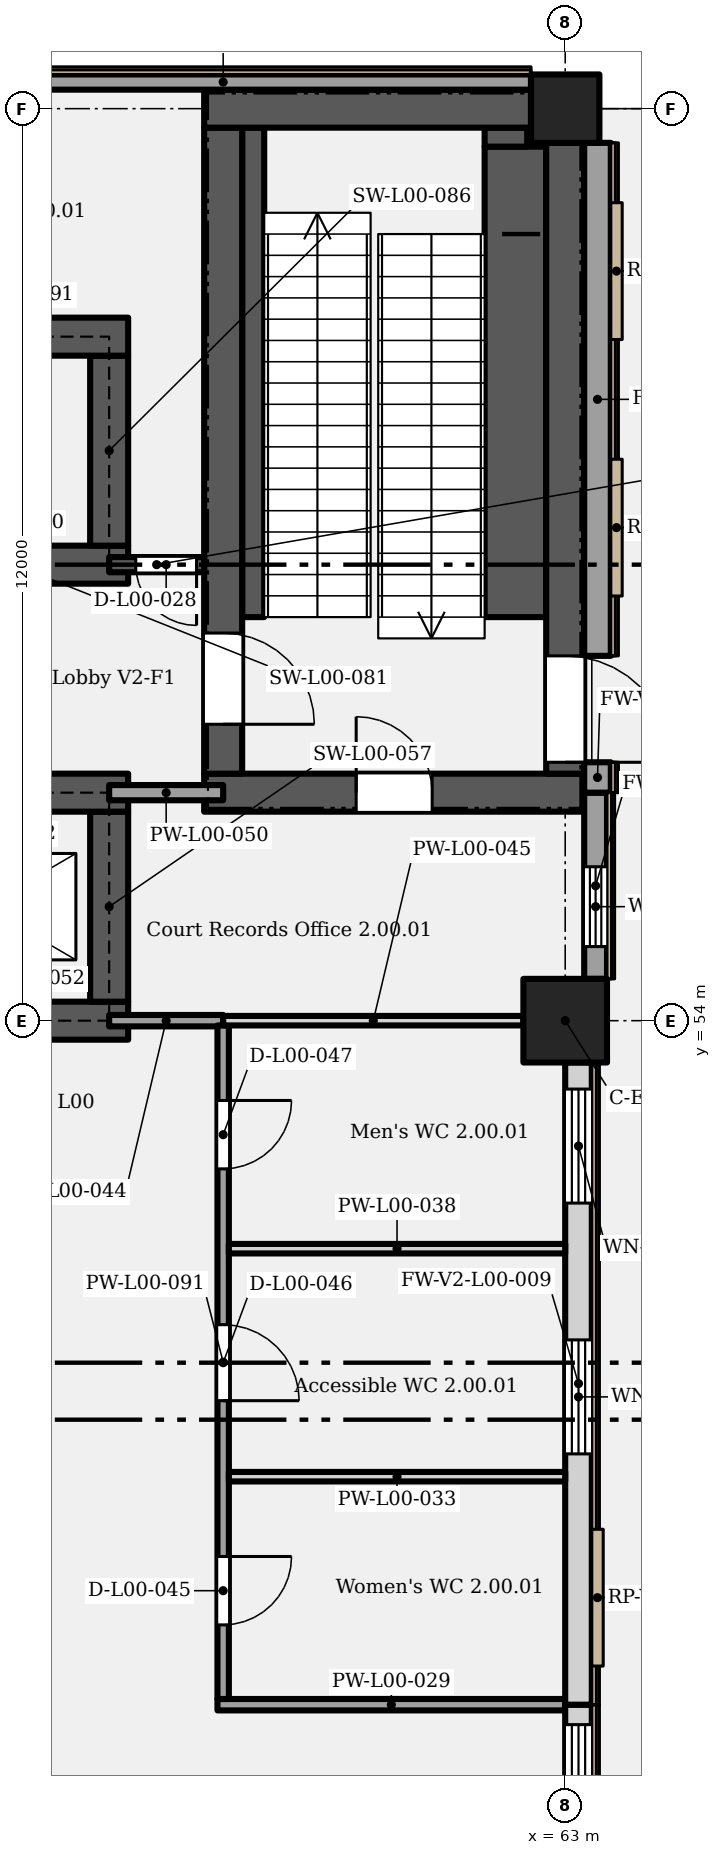
"""IFC4 building model, lengths in metres.
Left out: names, types, materials, properties, quantities, classifications, styles, units other than length and angle.
Written with IfcOpenShell. Run it as: python <this file> out.ifc"""

import sys

from ifc_helpers import new_model, si_unit, direction, frame, frame_2d, origin, origin_2d, place, context, subcontext, project, spatial, rectangle, extrude, element, fill, save


model = new_model("IFC4")
c1 = context("Model", 3, precision=1e-05, world=origin(), true_north=direction((0.0, 1.0)))
c2 = subcontext(c1, "Body", "Model", "MODEL_VIEW")
j1 = project(units=[si_unit("LENGTHUNIT", "METRE"), si_unit("PLANEANGLEUNIT", "RADIAN")], contexts=[c1])
p1 = place(None, origin())
s1 = spatial("IfcSite", under=j1, at=p1, CompositionType="ELEMENT")
p2 = place(p1, origin())
s2 = spatial("IfcBuilding", under=s1, at=p2, CompositionType="ELEMENT")
p3 = place(p2, origin())
s3 = spatial("IfcBuildingStorey", under=s2, at=p3, CompositionType="ELEMENT", Elevation=0.0)
p4 = place(p3, frame((63.0, 54.0, 0.0), z_axis=(0.0, 0.0, 1.0), x_axis=(1.0, 0.0, 0.0)))
e1 = element("IfcColumn", 1, at=p4, inside=s3, PredefinedType="COLUMN", context=c2, shape_type="SweptSolid", body=[
    extrude(rectangle(XDim=1.1, YDim=1.1, at=origin_2d()), origin(), (0.0, 0.0, 1.0), 6.6),
])
p5 = place(p3, frame((63.0, 66.0, 0.0), z_axis=(0.0, 0.0, 1.0), x_axis=(1.0, 0.0, 0.0)))
e2 = element("IfcColumn", 2, at=p5, inside=s3, PredefinedType="COLUMN", context=c2, shape_type="SweptSolid", body=[
    extrude(rectangle(XDim=0.9, YDim=0.9, at=origin_2d()), origin(), (0.0, 0.0, 1.0), 6.6),
])
p6 = place(p3, frame((54.55, 54.0, 0.0), z_axis=(0.0, 0.0, 1.0), x_axis=(1.0, 0.0, 0.0)))
e3 = element("IfcWall", 3, at=p6, inside=s3, PredefinedType="SHEAR", context=c2, shape_type="SweptSolid", body=[
    extrude(rectangle(XDim=2.7, YDim=0.5, at=frame_2d((1.35, 0.0))), origin(), (0.0, 0.0, 1.0), 6.3),
])
p7 = place(p3, frame((57.0, 54.25, 0.0), z_axis=(0.0, 0.0, 1.0), x_axis=(0.0, 1.0, 0.0)))
e4 = element("IfcWall", 4, at=p7, inside=s3, PredefinedType="SHEAR", context=c2, shape_type="SweptSolid", body=[
    extrude(rectangle(XDim=2.5, YDim=0.5, at=frame_2d((1.25, 0.0))), origin(), (0.0, 0.0, 1.0), 6.3),
])
p8 = place(p3, frame((46.25, 57.0, 0.0), z_axis=(0.0, 0.0, 1.0), x_axis=(1.0, 0.0, 0.0)))
e5 = element("IfcWall", 5, at=p8, inside=s3, PredefinedType="SHEAR", context=c2, shape_type="SweptSolid", body=[
    extrude(rectangle(XDim=11.0, YDim=0.5, at=frame_2d((5.5, 0.0))), origin(), (0.0, 0.0, 1.0), 6.3),
])
p9 = place(p8, frame((6.1, 0.0, 0.0), z_axis=(0.0, 0.0, 1.0), x_axis=(-1.0, 0.0, 0.0)))
e6 = element("IfcOpeningElement", 6, at=p9, cuts=e5, PredefinedType="OPENING", context=c2, shape_type="SweptSolid", body=[
    extrude(rectangle(XDim=1.2, YDim=2.1, at=frame_2d((0.6, 1.05))), frame((0.0, 0.26, 0.0), z_axis=(0.0, -1.0, 0.0), x_axis=(1.0, 0.0, 0.0)), (0.0, 0.0, 1.0), 0.52),
])
p10 = place(p3, frame((58.25, 57.0, 0.0), z_axis=(0.0, 0.0, 1.0), x_axis=(1.0, 0.0, 0.0)))
e7 = element("IfcWall", 7, at=p10, inside=s3, PredefinedType="SHEAR", context=c2, shape_type="SweptSolid", body=[
    extrude(rectangle(XDim=5.0, YDim=0.5, at=frame_2d((2.5, 0.0))), origin(), (0.0, 0.0, 1.0), 6.3),
])
p11 = place(p10, frame((2.0, 0.0, 0.0)))
e8 = element("IfcOpeningElement", 8, at=p11, cuts=e7, PredefinedType="OPENING", context=c2, shape_type="SweptSolid", body=[
    extrude(rectangle(XDim=1.0, YDim=2.1, at=frame_2d((0.5, 1.05))), frame((0.0, 0.26, 0.0), z_axis=(0.0, -1.0, 0.0), x_axis=(1.0, 0.0, 0.0)), (0.0, 0.0, 1.0), 0.52),
])
p12 = place(p3, frame((58.5, 57.25, 0.0), z_axis=(0.0, 0.0, 1.0), x_axis=(0.0, 1.0, 0.0)))
e9 = element("IfcWall", 9, at=p12, inside=s3, PredefinedType="SHEAR", context=c2, shape_type="SweptSolid", body=[
    extrude(rectangle(XDim=8.5, YDim=0.5, at=frame_2d((4.25, 0.0))), origin(), (0.0, 0.0, 1.0), 6.3),
])
p13 = place(p12, frame((1.85, 0.0, 0.0), z_axis=(0.0, 0.0, 1.0), x_axis=(-1.0, 0.0, 0.0)))
e10 = element("IfcOpeningElement", 10, at=p13, cuts=e9, PredefinedType="OPENING", context=c2, shape_type="SweptSolid", body=[
    extrude(rectangle(XDim=1.2, YDim=2.1, at=frame_2d((0.6, 1.05))), frame((0.0, 0.26, 0.0), z_axis=(0.0, -1.0, 0.0), x_axis=(1.0, 0.0, 0.0)), (0.0, 0.0, 1.0), 0.52),
])
p14 = place(p3, frame((63.0, 57.25, 0.0), z_axis=(0.0, 0.0, 1.0), x_axis=(0.0, 1.0, 0.0)))
e11 = element("IfcWall", 11, at=p14, inside=s3, PredefinedType="SHEAR", context=c2, shape_type="SweptSolid", body=[
    extrude(rectangle(XDim=8.3, YDim=0.5, at=frame_2d((4.15, 0.0))), origin(), (0.0, 0.0, 1.0), 6.3),
])
p15 = place(p14, frame((1.55, 0.0, 0.0), z_axis=(0.0, 0.0, 1.0), x_axis=(-1.0, 0.0, 0.0)))
e12 = element("IfcOpeningElement", 12, at=p15, cuts=e11, PredefinedType="OPENING", context=c2, shape_type="SweptSolid", body=[
    extrude(rectangle(XDim=1.4, YDim=2.1, at=frame_2d((0.7, 1.05))), frame((0.0, 0.26, 0.0), z_axis=(0.0, -1.0, 0.0), x_axis=(1.0, 0.0, 0.0)), (0.0, 0.0, 1.0), 0.52),
])
p16 = place(p3, frame((54.25, 60.0, 0.0), z_axis=(0.0, 0.0, 1.0), x_axis=(1.0, 0.0, 0.0)))
e13 = element("IfcWall", 13, at=p16, inside=s3, PredefinedType="SHEAR", context=c2, shape_type="SweptSolid", body=[
    extrude(rectangle(XDim=3.0, YDim=0.5, at=frame_2d((1.5, 0.0))), origin(), (0.0, 0.0, 1.0), 6.3),
])
p17 = place(p16, frame((0.7, 0.0, 0.0)))
e14 = element("IfcOpeningElement", 14, at=p17, cuts=e13, PredefinedType="OPENING", context=c2, shape_type="SweptSolid", body=[
    extrude(rectangle(XDim=1.1, YDim=2.1, at=frame_2d((0.55, 1.05))), frame((0.0, 0.26, 0.0), z_axis=(0.0, -1.0, 0.0), x_axis=(1.0, 0.0, 0.0)), (0.0, 0.0, 1.0), 0.52),
])
p18 = place(p3, frame((57.0, 60.25, 0.0), z_axis=(0.0, 0.0, 1.0), x_axis=(0.0, 1.0, 0.0)))
e15 = element("IfcWall", 15, at=p18, inside=s3, PredefinedType="SHEAR", context=c2, shape_type="SweptSolid", body=[
    extrude(rectangle(XDim=2.5, YDim=0.5, at=frame_2d((1.25, 0.0))), origin(), (0.0, 0.0, 1.0), 6.3),
])
p19 = place(p3, frame((54.25, 63.0, 0.0), z_axis=(0.0, 0.0, 1.0), x_axis=(1.0, 0.0, 0.0)))
e16 = element("IfcWall", 16, at=p19, inside=s3, PredefinedType="SHEAR", context=c2, shape_type="SweptSolid", body=[
    extrude(rectangle(XDim=3.0, YDim=0.5, at=frame_2d((1.5, 0.0))), origin(), (0.0, 0.0, 1.0), 6.3),
])
p20 = place(p3, frame((58.25, 66.0, 0.0), z_axis=(0.0, 0.0, 1.0), x_axis=(1.0, 0.0, 0.0)))
e17 = element("IfcWall", 17, at=p20, inside=s3, PredefinedType="SHEAR", context=c2, shape_type="SweptSolid", body=[
    extrude(rectangle(XDim=4.3, YDim=0.5, at=frame_2d((2.15, 0.0))), origin(), (0.0, 0.0, 1.0), 6.3),
])
p21 = place(p3, frame((54.45, 66.35, 0.0), z_axis=(0.0, 0.0, 1.0), x_axis=(1.0, 0.0, 0.0)))
e18 = element("IfcWall", 18, at=p21, inside=s3, PredefinedType="SOLIDWALL", context=c2, shape_type="SweptSolid", body=[
    extrude(rectangle(XDim=8.1, YDim=0.2, at=frame_2d((4.05, 0.0))), origin(), (0.0, 0.0, 1.0), 6.3),
])
p22 = place(p3, frame((63.175, 38.05, 0.0), z_axis=(0.0, 0.0, 1.0), x_axis=(0.0, 1.0, 0.0)))
e19 = element("IfcWall", 19, at=p22, inside=s3, PredefinedType="SOLIDWALL", context=c2, shape_type="SweptSolid", body=[
    extrude(rectangle(XDim=6.95, YDim=0.35, at=frame_2d((3.475, 0.0))), origin(), (0.0, 0.0, 1.0), 6.3),
])
p23 = place(p22, frame((0.462, 0.0, 0.9)))
e20 = element("IfcOpeningElement", 20, at=p23, cuts=e19, PredefinedType="OPENING", context=c2, shape_type="SweptSolid", body=[
    extrude(rectangle(XDim=2.1, YDim=3.6, at=frame_2d((1.05, 1.8))), frame((0.0, 0.185, 0.0), z_axis=(0.0, -1.0, 0.0), x_axis=(1.0, 0.0, 0.0)), (0.0, 0.0, 1.0), 0.37),
])
p24 = place(p22, frame((4.587, 0.0, 0.9)))
e21 = element("IfcOpeningElement", 21, at=p24, cuts=e19, PredefinedType="OPENING", context=c2, shape_type="SweptSolid", body=[
    extrude(rectangle(XDim=2.1, YDim=3.6, at=frame_2d((1.05, 1.8))), frame((0.0, 0.185, 0.0), z_axis=(0.0, -1.0, 0.0), x_axis=(1.0, 0.0, 0.0)), (0.0, 0.0, 1.0), 0.37),
])
p25 = place(p3, frame((63.175, 45.0, 0.0), z_axis=(0.0, 0.0, 1.0), x_axis=(0.0, 1.0, 0.0)))
e22 = element("IfcWall", 22, at=p25, inside=s3, PredefinedType="SOLIDWALL", context=c2, shape_type="SweptSolid", body=[
    extrude(rectangle(XDim=8.45, YDim=0.35, at=frame_2d((4.225, 0.0))), origin(), (0.0, 0.0, 1.0), 6.3),
])
p26 = place(p25, frame((3.3, 0.0, 1.05)))
e23 = element("IfcOpeningElement", 23, at=p26, cuts=e22, PredefinedType="OPENING", context=c2, shape_type="SweptSolid", body=[
    extrude(rectangle(XDim=1.5, YDim=3.9, at=frame_2d((0.75, 1.95))), frame((0.0, 0.185, 0.0), z_axis=(0.0, -1.0, 0.0), x_axis=(1.0, 0.0, 0.0)), (0.0, 0.0, 1.0), 0.37),
])
p27 = place(p25, frame((6.6, 0.0, 1.05)))
e24 = element("IfcOpeningElement", 24, at=p27, cuts=e22, PredefinedType="OPENING", context=c2, shape_type="SweptSolid", body=[
    extrude(rectangle(XDim=1.5, YDim=3.9, at=frame_2d((0.75, 1.95))), frame((0.0, 0.185, 0.0), z_axis=(0.0, -1.0, 0.0), x_axis=(1.0, 0.0, 0.0)), (0.0, 0.0, 1.0), 0.37),
])
p28 = place(p3, frame((63.4, 54.55, 0.0), z_axis=(0.0, 0.0, 1.0), x_axis=(0.0, 1.0, 0.0)))
e25 = element("IfcWall", 25, at=p28, inside=s3, PredefinedType="SOLIDWALL", context=c2, shape_type="SweptSolid", body=[
    extrude(rectangle(XDim=2.45, YDim=0.3, at=frame_2d((1.225, 0.0))), origin(), (0.0, 0.0, 1.0), 6.3),
])
p29 = place(p28, frame((0.425, 0.0, 1.05)))
e26 = element("IfcOpeningElement", 26, at=p29, cuts=e25, PredefinedType="OPENING", context=c2, shape_type="SweptSolid", body=[
    extrude(rectangle(XDim=1.05, YDim=2.4, at=frame_2d((0.525, 1.2))), frame((0.0, 0.16, 0.0), z_axis=(0.0, -1.0, 0.0), x_axis=(1.0, 0.0, 0.0)), (0.0, 0.0, 1.0), 0.32),
])
p30 = place(p3, frame((63.425, 57.0, 0.0), z_axis=(0.0, 0.0, 1.0), x_axis=(0.0, 1.0, 0.0)))
e27 = element("IfcWall", 27, at=p30, inside=s3, PredefinedType="SOLIDWALL", context=c2, shape_type="SweptSolid", body=[
    extrude(rectangle(XDim=0.4, YDim=0.35, at=frame_2d((0.2, 0.0))), origin(), (0.0, 0.0, 1.0), 6.3),
])
p31 = place(p3, frame((63.425, 58.8, 0.0), z_axis=(0.0, 0.0, 1.0), x_axis=(0.0, 1.0, 0.0)))
e28 = element("IfcWall", 28, at=p31, inside=s3, PredefinedType="SOLIDWALL", context=c2, shape_type="SweptSolid", body=[
    extrude(rectangle(XDim=6.75, YDim=0.35, at=frame_2d((3.375, 0.0))), origin(), (0.0, 0.0, 1.0), 6.3),
])
p32 = place(p3, frame((58.425, 45.0, 0.0), z_axis=(0.0, 0.0, 1.0), x_axis=(1.0, 0.0, 0.0)))
e29 = element("IfcWall", 29, at=p32, inside=s3, PredefinedType="PARTITIONING", context=c2, shape_type="SweptSolid", body=[
    extrude(rectangle(XDim=4.575, YDim=0.15, at=frame_2d((2.288, 0.0))), origin(), (0.0, 0.0, 1.0), 6.3),
])
for number, where, z_axis, x_axis in (
    (30, (58.575, 48.0, 0.0), (0.0, 0.0, 1.0), (1.0, 0.0, 0.0)),
    (31, (58.575, 51.0, 0.0), (0.0, 0.0, 1.0), (1.0, 0.0, 0.0)),
):
    element("IfcWall", number, at=place(p3, frame(where, z_axis=z_axis, x_axis=x_axis)), inside=s3, PredefinedType="PARTITIONING", context=c2, shape_type="SweptSolid", body=[
        extrude(rectangle(XDim=4.425, YDim=0.125, at=frame_2d((2.212, 0.0))), origin(), (0.0, 0.0, 1.0), 6.3),
    ])
p33 = place(p3, frame((57.0, 54.0, 0.0), z_axis=(0.0, 0.0, 1.0), x_axis=(1.0, 0.0, 0.0)))
e32 = element("IfcWall", 32, at=p33, inside=s3, PredefinedType="PARTITIONING", context=c2, shape_type="SweptSolid", body=[
    extrude(rectangle(XDim=1.5, YDim=0.15, at=frame_2d((0.75, 0.0))), origin(), (0.0, 0.0, 1.0), 5.55),
])
p34 = place(p3, frame((58.5, 54.0, 0.0), z_axis=(0.0, 0.0, 1.0), x_axis=(1.0, 0.0, 0.0)))
e33 = element("IfcWall", 33, at=p34, inside=s3, PredefinedType="PARTITIONING", context=c2, shape_type="SweptSolid", body=[
    extrude(rectangle(XDim=3.95, YDim=0.125, at=frame_2d((1.975, 0.0))), origin(), (0.0, 0.0, 1.0), 5.55),
])
p35 = place(p3, frame((57.0, 57.0, 0.0), z_axis=(0.0, 0.0, 1.0), x_axis=(1.0, 0.0, 0.0)))
e34 = element("IfcWall", 34, at=p35, inside=s3, PredefinedType="PARTITIONING", context=c2, shape_type="SweptSolid", body=[
    extrude(rectangle(XDim=1.5, YDim=0.2, at=frame_2d((0.75, 0.0))), origin(), (0.0, 0.0, 1.0), 6.3),
])
p36 = place(p3, frame((57.0, 60.0, 0.0), z_axis=(0.0, 0.0, 1.0), x_axis=(1.0, 0.0, 0.0)))
e35 = element("IfcWall", 35, at=p36, inside=s3, PredefinedType="SHEAR", context=c2, shape_type="SweptSolid", body=[
    extrude(rectangle(XDim=1.25, YDim=0.2, at=frame_2d((0.625, 0.0))), origin(), (0.0, 0.0, 1.0), 6.3),
])
p37 = place(p36, frame((1.15, 0.0, 0.0), z_axis=(0.0, 0.0, 1.0), x_axis=(-1.0, 0.0, 0.0)))
e36 = element("IfcOpeningElement", 36, at=p37, cuts=e35, PredefinedType="OPENING", context=c2, shape_type="SweptSolid", body=[
    extrude(rectangle(XDim=0.8, YDim=2.0, at=frame_2d((0.4, 1.0))), frame((0.0, 0.11, 0.0), z_axis=(0.0, -1.0, 0.0), x_axis=(1.0, 0.0, 0.0)), (0.0, 0.0, 1.0), 0.22),
])
p38 = place(p3, frame((58.5, 45.075, 0.0), z_axis=(0.0, 0.0, 1.0), x_axis=(0.0, 1.0, 0.0)))
e37 = element("IfcWall", 37, at=p38, inside=s3, PredefinedType="PARTITIONING", context=c2, shape_type="SweptSolid", body=[
    extrude(rectangle(XDim=8.863, YDim=0.15, at=frame_2d((4.431, 0.0))), origin(), (0.0, 0.0, 1.0), 6.3),
])
p39 = place(p38, frame((1.875, 0.0, 0.0), z_axis=(0.0, 0.0, 1.0), x_axis=(-1.0, 0.0, 0.0)))
e38 = element("IfcOpeningElement", 38, at=p39, cuts=e37, PredefinedType="OPENING", context=c2, shape_type="SweptSolid", body=[
    extrude(rectangle(XDim=0.9, YDim=2.1, at=frame_2d((0.45, 1.05))), frame((0.0, 0.085, 0.0), z_axis=(0.0, -1.0, 0.0), x_axis=(1.0, 0.0, 0.0)), (0.0, 0.0, 1.0), 0.17),
])
p40 = place(p38, frame((4.925, 0.0, 0.0), z_axis=(0.0, 0.0, 1.0), x_axis=(-1.0, 0.0, 0.0)))
e39 = element("IfcOpeningElement", 39, at=p40, cuts=e37, PredefinedType="OPENING", context=c2, shape_type="SweptSolid", body=[
    extrude(rectangle(XDim=1.0, YDim=2.1, at=frame_2d((0.5, 1.05))), frame((0.0, 0.085, 0.0), z_axis=(0.0, -1.0, 0.0), x_axis=(1.0, 0.0, 0.0)), (0.0, 0.0, 1.0), 0.17),
])
p41 = place(p38, frame((7.875, 0.0, 0.0), z_axis=(0.0, 0.0, 1.0), x_axis=(-1.0, 0.0, 0.0)))
e40 = element("IfcOpeningElement", 40, at=p41, cuts=e37, PredefinedType="OPENING", context=c2, shape_type="SweptSolid", body=[
    extrude(rectangle(XDim=0.9, YDim=2.1, at=frame_2d((0.45, 1.05))), frame((0.0, 0.085, 0.0), z_axis=(0.0, -1.0, 0.0), x_axis=(1.0, 0.0, 0.0)), (0.0, 0.0, 1.0), 0.17),
])
p42 = place(p3, frame((58.895, 59.31, 0.0), z_axis=(0.0, 0.0, 1.0), x_axis=(0.0, 1.0, 0.0)))
e41 = element("IfcWall", 41, at=p42, inside=s3, PredefinedType="SHEAR", context=c2, shape_type="SweptSolid", body=[
    extrude(rectangle(XDim=6.44, YDim=0.29, at=frame_2d((3.22, 0.0))), origin(), (0.0, 0.0, 1.0), 3.1),
])
p43 = place(p3, frame((62.345, 59.31, 0.0), z_axis=(0.0, 0.0, 1.0), x_axis=(0.0, 1.0, 0.0)))
e42 = element("IfcWall", 42, at=p43, inside=s3, PredefinedType="SHEAR", context=c2, shape_type="SweptSolid", body=[
    extrude(rectangle(XDim=6.19, YDim=0.81, at=frame_2d((3.095, 0.0))), origin(), (0.0, 0.0, 1.0), 3.1),
])
p44 = place(p3, frame((62.22, 65.5, 0.0), z_axis=(0.0, 0.0, 1.0), x_axis=(0.0, 1.0, 0.0)))
e43 = element("IfcWall", 43, at=p44, inside=s3, PredefinedType="SHEAR", context=c2, shape_type="SweptSolid", body=[
    extrude(rectangle(XDim=0.25, YDim=0.56, at=frame_2d((0.125, 0.0))), origin(), (0.0, 0.0, 1.0), 3.1),
])
p45 = place(p24, origin())
e44 = element("IfcWindow", 44, at=p45, inside=s3, PartitioningType="SINGLE_PANEL", PredefinedType="WINDOW", context=c2, shape_type="SweptSolid", body=[
    extrude(rectangle(XDim=2.1, YDim=3.6, at=frame_2d((1.05, 1.8))), frame((0.0, 0.03, 0.0), z_axis=(0.0, -1.0, 0.0), x_axis=(1.0, 0.0, 0.0)), (0.0, 0.0, 1.0), 0.06),
])
fill(e21, e44)
p46 = place(p26, origin())
e45 = element("IfcWindow", 45, at=p46, inside=s3, PartitioningType="SINGLE_PANEL", PredefinedType="WINDOW", context=c2, shape_type="SweptSolid", body=[
    extrude(rectangle(XDim=1.5, YDim=3.9, at=frame_2d((0.75, 1.95))), frame((0.0, 0.03, 0.0), z_axis=(0.0, -1.0, 0.0), x_axis=(1.0, 0.0, 0.0)), (0.0, 0.0, 1.0), 0.06),
])
fill(e23, e45)
p47 = place(p27, origin())
e46 = element("IfcWindow", 46, at=p47, inside=s3, PartitioningType="SINGLE_PANEL", PredefinedType="WINDOW", context=c2, shape_type="SweptSolid", body=[
    extrude(rectangle(XDim=1.5, YDim=3.9, at=frame_2d((0.75, 1.95))), frame((0.0, 0.03, 0.0), z_axis=(0.0, -1.0, 0.0), x_axis=(1.0, 0.0, 0.0)), (0.0, 0.0, 1.0), 0.06),
])
fill(e24, e46)
p48 = place(p29, origin())
e47 = element("IfcWindow", 47, at=p48, inside=s3, PartitioningType="SINGLE_PANEL", PredefinedType="WINDOW", context=c2, shape_type="SweptSolid", body=[
    extrude(rectangle(XDim=1.05, YDim=2.4, at=frame_2d((0.525, 1.2))), frame((0.0, 0.03, 0.0), z_axis=(0.0, -1.0, 0.0), x_axis=(1.0, 0.0, 0.0)), (0.0, 0.0, 1.0), 0.06),
])
fill(e26, e47)
p49 = place(p15, origin())
e48 = element("IfcDoor", 48, at=p49, inside=s3, OperationType="SINGLE_SWING_LEFT", PredefinedType="DOOR", context=c2, shape_type="SweptSolid", body=[
    extrude(rectangle(XDim=1.4, YDim=2.1, at=frame_2d((0.7, 1.05))), frame((0.0, 0.025, 0.0), z_axis=(0.0, -1.0, 0.0), x_axis=(1.0, 0.0, 0.0)), (0.0, 0.0, 1.0), 0.05),
])
fill(e12, e48)
p50 = place(p13, origin())
e49 = element("IfcDoor", 49, at=p50, inside=s3, OperationType="SINGLE_SWING_RIGHT", PredefinedType="DOOR", context=c2, shape_type="SweptSolid", body=[
    extrude(rectangle(XDim=1.2, YDim=2.1, at=frame_2d((0.6, 1.05))), frame((0.0, 0.025, 0.0), z_axis=(0.0, -1.0, 0.0), x_axis=(1.0, 0.0, 0.0)), (0.0, 0.0, 1.0), 0.05),
])
fill(e10, e49)
p51 = place(p37, origin())
e50 = element("IfcDoor", 50, at=p51, inside=s3, OperationType="SINGLE_SWING_LEFT", PredefinedType="DOOR", context=c2, shape_type="SweptSolid", body=[
    extrude(rectangle(XDim=0.8, YDim=2.0, at=frame_2d((0.4, 1.0))), frame((0.0, 0.025, 0.0), z_axis=(0.0, -1.0, 0.0), x_axis=(1.0, 0.0, 0.0)), (0.0, 0.0, 1.0), 0.05),
])
fill(e36, e50)
p52 = place(p39, origin())
e51 = element("IfcDoor", 51, at=p52, inside=s3, OperationType="SINGLE_SWING_LEFT", PredefinedType="DOOR", context=c2, shape_type="SweptSolid", body=[
    extrude(rectangle(XDim=0.9, YDim=2.1, at=frame_2d((0.45, 1.05))), frame((0.0, 0.025, 0.0), z_axis=(0.0, -1.0, 0.0), x_axis=(1.0, 0.0, 0.0)), (0.0, 0.0, 1.0), 0.05),
])
fill(e38, e51)
p53 = place(p40, origin())
e52 = element("IfcDoor", 52, at=p53, inside=s3, OperationType="SINGLE_SWING_RIGHT", PredefinedType="DOOR", context=c2, shape_type="SweptSolid", body=[
    extrude(rectangle(XDim=1.0, YDim=2.1, at=frame_2d((0.5, 1.05))), frame((0.0, 0.025, 0.0), z_axis=(0.0, -1.0, 0.0), x_axis=(1.0, 0.0, 0.0)), (0.0, 0.0, 1.0), 0.05),
])
fill(e39, e52)
p54 = place(p41, origin())
e53 = element("IfcDoor", 53, at=p54, inside=s3, OperationType="SINGLE_SWING_LEFT", PredefinedType="DOOR", context=c2, shape_type="SweptSolid", body=[
    extrude(rectangle(XDim=0.9, YDim=2.1, at=frame_2d((0.45, 1.05))), frame((0.0, 0.025, 0.0), z_axis=(0.0, -1.0, 0.0), x_axis=(1.0, 0.0, 0.0)), (0.0, 0.0, 1.0), 0.05),
])
fill(e40, e53)
p55 = place(p11, origin())
e54 = element("IfcDoor", 54, at=p55, inside=s3, OperationType="SINGLE_SWING_LEFT", PredefinedType="DOOR", context=c2, shape_type="SweptSolid", body=[
    extrude(rectangle(XDim=1.0, YDim=2.1, at=frame_2d((0.5, 1.05))), frame((0.0, 0.025, 0.0), z_axis=(0.0, -1.0, 0.0), x_axis=(1.0, 0.0, 0.0)), (0.0, 0.0, 1.0), 0.05),
])
fill(e8, e54)
save(model, sys.argv[1])
